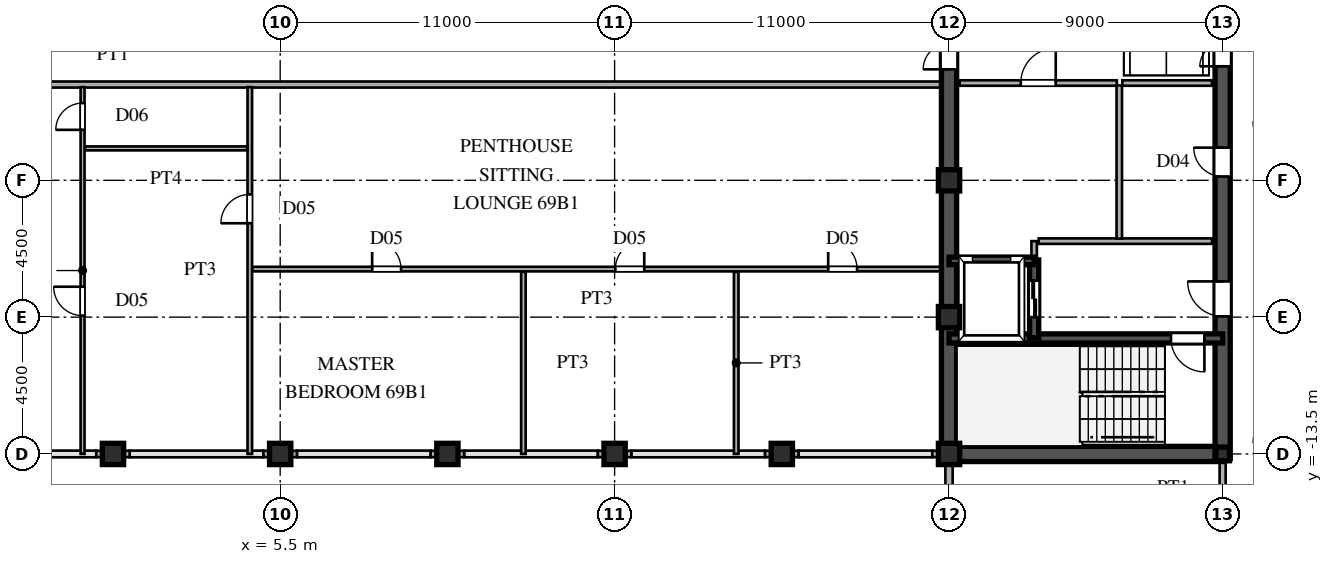
"""IFC4 building model, lengths in metres.
Left out: names, types, materials, properties, quantities, classifications, styles, units other than length and angle.
Written with IfcOpenShell. Run it as: python <this file> out.ifc"""

import sys

from ifc_helpers import new_model, si_unit, direction, frame, frame_2d, origin, origin_2d, place, context, subcontext, project, spatial, rectangle, hollow_rectangle, i_section, extrude, source, transform, mapped, element, fill, save


model = new_model("IFC4")
c1 = context("Model", 3, precision=1e-05, world=origin(), true_north=direction((0.0, 1.0)))
c2 = subcontext(c1, "Body", "Model", "MODEL_VIEW")
j1 = project(units=[si_unit("LENGTHUNIT", "METRE"), si_unit("PLANEANGLEUNIT", "RADIAN")], contexts=[c1])
p1 = place(None, origin())
s1 = spatial("IfcSite", under=j1, at=p1, CompositionType="ELEMENT")
p2 = place(p1, origin())
s2 = spatial("IfcBuilding", under=s1, at=p2, CompositionType="ELEMENT")
p3 = place(p2, frame((0.0, 0.0, 261.9)))
s3 = spatial("IfcBuildingStorey", under=s2, at=p3, CompositionType="ELEMENT", Elevation=261.9)
m1 = source(origin(), c2, "Body", "SweptSolid", [
    extrude(hollow_rectangle(XDim=0.7, YDim=0.7, WallThickness=0.03, at=origin_2d()), origin(), (0.0, 0.0, 1.0), 3.75),
])
for number, where, z_axis, x_axis in (
    (1, (27.5, -13.5, 0.0), (0.0, 0.0, 1.0), (1.0, 0.0, 0.0)),
    (2, (27.5, -9.0, 0.0), (0.0, 0.0, 1.0), (1.0, 0.0, 0.0)),
    (3, (27.5, -4.5, 0.0), (0.0, 0.0, 1.0), (1.0, 0.0, 0.0)),
):
    element("IfcColumn", number, at=place(p3, frame(where, z_axis=z_axis, x_axis=x_axis)), inside=s3, PredefinedType="COLUMN", context=c2, shape_type="MappedRepresentation", body=[
        mapped(m1, transform((0.0, 0.0, 0.0), scale=1.0)),
    ])
m2 = source(origin(), c2, "Body", "SweptSolid", [
    extrude(i_section(OverallWidth=0.45, OverallDepth=0.45, WebThickness=0.016, FlangeThickness=0.025, at=origin_2d()), origin(), (0.0, 0.0, 1.0), 3.75),
])
p4 = place(p3, frame((36.5, -13.5, 0.0), z_axis=(0.0, 0.0, 1.0), x_axis=(1.0, 0.0, 0.0)))
e4 = element("IfcColumn", 4, at=p4, inside=s3, PredefinedType="COLUMN", context=c2, shape_type="MappedRepresentation", body=[
    mapped(m2, transform((0.0, 0.0, 0.0), scale=1.0)),
])
for number, where, z_axis, x_axis in (
    (5, (0.0, -13.5, 0.0), (0.0, 0.0, 1.0), (1.0, 0.0, 0.0)),
    (6, (5.5, -13.5, 0.0), (0.0, 0.0, 1.0), (1.0, 0.0, 0.0)),
    (7, (11.0, -13.5, 0.0), (0.0, 0.0, 1.0), (1.0, 0.0, 0.0)),
    (8, (16.5, -13.5, 0.0), (0.0, 0.0, 1.0), (1.0, 0.0, 0.0)),
    (9, (22.0, -13.5, 0.0), (0.0, 0.0, 1.0), (1.0, 0.0, 0.0)),
):
    element("IfcColumn", number, at=place(p3, frame(where, z_axis=z_axis, x_axis=x_axis)), inside=s3, PredefinedType="COLUMN", context=c2, shape_type="MappedRepresentation", body=[
        mapped(m1, transform((0.0, 0.0, 0.0), scale=1.0)),
    ])
p5 = place(p3, frame((27.5, -15.98, 0.0), z_axis=(0.0, 0.0, 1.0), x_axis=(0.0, 1.0, 0.0)))
e10 = element("IfcWall", 10, at=p5, inside=s3, PredefinedType="SOLIDWALL", context=c2, shape_type="SweptSolid", body=[
    extrude(rectangle(XDim=1.605, YDim=0.24, at=frame_2d((0.803, 0.0))), origin(), (0.0, 0.0, 1.0), 3.53),
])
p6 = place(p3, frame((27.5, -14.375, 0.0), z_axis=(0.0, 0.0, 1.0), x_axis=(0.0, 1.0, 0.0)))
e11 = element("IfcWall", 11, at=p6, inside=s3, PredefinedType="SOLIDWALL", context=c2, shape_type="SweptSolid", body=[
    extrude(rectangle(XDim=0.62, YDim=0.24, at=frame_2d((0.31, 0.0))), origin(), (0.0, 0.0, 1.0), 3.03),
])
for number, where, z_axis, x_axis in (
    (12, (-0.55, -13.5, 0.0), (0.0, 0.0, 1.0), (1.0, 0.0, 0.0)),
    (13, (4.95, -13.5, 0.0), (0.0, 0.0, 1.0), (1.0, 0.0, 0.0)),
    (14, (10.45, -13.5, 0.0), (0.0, 0.0, 1.0), (1.0, 0.0, 0.0)),
    (15, (15.95, -13.5, 0.0), (0.0, 0.0, 1.0), (1.0, 0.0, 0.0)),
    (16, (21.45, -13.5, 0.0), (0.0, 0.0, 1.0), (1.0, 0.0, 0.0)),
):
    element("IfcWall", number, at=place(p3, frame(where, z_axis=z_axis, x_axis=x_axis)), inside=s3, PredefinedType="SOLIDWALL", context=c2, shape_type="SweptSolid", body=[
        extrude(rectangle(XDim=1.1, YDim=0.21, at=frame_2d((0.55, 0.0))), origin(), (0.0, 0.0, 1.0), 3.03),
    ])
p7 = place(p3, frame((26.95, -13.5, 0.0), z_axis=(0.0, 0.0, 1.0), x_axis=(1.0, 0.0, 0.0)))
e17 = element("IfcWall", 17, at=p7, inside=s3, PredefinedType="SOLIDWALL", context=c2, shape_type="SweptSolid", body=[
    extrude(rectangle(XDim=0.54, YDim=0.21, at=frame_2d((0.27, 0.0))), origin(), (0.0, 0.0, 1.0), 3.03),
])
p8 = place(p3, frame((27.5, -13.5, 0.0), z_axis=(0.0, 0.0, 1.0), x_axis=(0.0, 1.0, 0.0)))
e18 = element("IfcWall", 18, at=p8, inside=s3, PredefinedType="SHEAR", context=c2, shape_type="SweptSolid", body=[
    extrude(rectangle(XDim=12.2, YDim=0.5, at=frame_2d((6.1, 0.0))), origin(), (0.0, 0.0, 1.0), 3.53),
])
p9 = place(p3, frame((27.5, -1.3, 0.0), z_axis=(0.0, 0.0, 1.0), x_axis=(0.0, 1.0, 0.0)))
e19 = element("IfcWall", 19, at=p9, inside=s3, PredefinedType="SHEAR", context=c2, shape_type="SweptSolid", body=[
    extrude(rectangle(XDim=2.6, YDim=0.5, at=frame_2d((1.3, 0.0))), origin(), (0.0, 0.0, 1.0), 3.53),
])
p10 = place(p9, frame((0.45, 0.0, 0.0)))
e20 = element("IfcOpeningElement", 20, at=p10, cuts=e19, PredefinedType="OPENING", context=c2, shape_type="SweptSolid", body=[
    extrude(rectangle(XDim=1.7, YDim=2.35, at=frame_2d((0.85, 1.175))), frame((0.0, 0.26, 0.0), z_axis=(0.0, -1.0, 0.0), x_axis=(1.0, 0.0, 0.0)), (0.0, 0.0, 1.0), 0.52),
])
p11 = place(p3, frame((27.5, -13.5, 0.0), z_axis=(0.0, 0.0, 1.0), x_axis=(1.0, 0.0, 0.0)))
e21 = element("IfcWall", 21, at=p11, inside=s3, PredefinedType="SHEAR", context=c2, shape_type="SweptSolid", body=[
    extrude(rectangle(XDim=9.0, YDim=0.5, at=frame_2d((4.5, 0.0))), origin(), (0.0, 0.0, 1.0), 3.53),
])
p12 = place(p3, frame((36.5, -13.65, 0.0), z_axis=(0.0, 0.0, 1.0), x_axis=(0.0, 1.0, 0.0)))
e22 = element("IfcWall", 22, at=p12, inside=s3, PredefinedType="SHEAR", context=c2, shape_type="SweptSolid", body=[
    extrude(rectangle(XDim=7.15, YDim=0.5, at=frame_2d((3.575, 0.0))), origin(), (0.0, 0.0, 1.0), 3.53),
])
p13 = place(p12, frame((4.675, 0.0, 0.0)))
e23 = element("IfcOpeningElement", 23, at=p13, cuts=e22, PredefinedType="OPENING", context=c2, shape_type="SweptSolid", body=[
    extrude(rectangle(XDim=1.15, YDim=2.2, at=frame_2d((0.575, 1.1))), frame((0.0, 0.26, 0.0), z_axis=(0.0, -1.0, 0.0), x_axis=(1.0, 0.0, 0.0)), (0.0, 0.0, 1.0), 0.52),
])
p14 = place(p3, frame((36.5, -1.3, 0.0), z_axis=(0.0, 0.0, 1.0), x_axis=(0.0, 1.0, 0.0)))
e24 = element("IfcWall", 24, at=p14, inside=s3, PredefinedType="SHEAR", context=c2, shape_type="SweptSolid", body=[
    extrude(rectangle(XDim=2.6, YDim=0.5, at=frame_2d((1.3, 0.0))), origin(), (0.0, 0.0, 1.0), 3.53),
])
p15 = place(p14, frame((0.55, 0.0, 0.0)))
e25 = element("IfcOpeningElement", 25, at=p15, cuts=e24, PredefinedType="OPENING", context=c2, shape_type="SweptSolid", body=[
    extrude(rectangle(XDim=1.5, YDim=2.3, at=frame_2d((0.75, 1.15))), frame((0.0, 0.26, 0.0), z_axis=(0.0, -1.0, 0.0), x_axis=(1.0, 0.0, 0.0)), (0.0, 0.0, 1.0), 0.52),
])
p16 = place(p3, frame((36.5, -6.5, 0.0), z_axis=(0.0, 0.0, 1.0), x_axis=(0.0, 1.0, 0.0)))
e26 = element("IfcWall", 26, at=p16, inside=s3, PredefinedType="SHEAR", context=c2, shape_type="SweptSolid", body=[
    extrude(rectangle(XDim=5.2, YDim=0.5, at=frame_2d((2.6, 0.0))), origin(), (0.0, 0.0, 1.0), 3.53),
])
p17 = place(p16, frame((2.125, 0.0, 0.0)))
e27 = element("IfcOpeningElement", 27, at=p17, cuts=e26, PredefinedType="OPENING", context=c2, shape_type="SweptSolid", body=[
    extrude(rectangle(XDim=0.95, YDim=2.15, at=frame_2d((0.475, 1.075))), frame((0.0, 0.26, 0.0), z_axis=(0.0, -1.0, 0.0), x_axis=(1.0, 0.0, 0.0)), (0.0, 0.0, 1.0), 0.52),
])
p18 = place(p3, frame((27.5, -9.7, 0.0), z_axis=(0.0, 0.0, 1.0), x_axis=(1.0, 0.0, 0.0)))
e28 = element("IfcWall", 28, at=p18, inside=s3, PredefinedType="SHEAR", context=c2, shape_type="SweptSolid", body=[
    extrude(rectangle(XDim=9.0, YDim=0.3, at=frame_2d((4.5, 0.0))), origin(), (0.0, 0.0, 1.0), 3.53),
])
p19 = place(p18, frame((7.3, 0.0, 0.0)))
e29 = element("IfcOpeningElement", 29, at=p19, cuts=e28, PredefinedType="OPENING", context=c2, shape_type="SweptSolid", body=[
    extrude(rectangle(XDim=1.1, YDim=2.2, at=frame_2d((0.55, 1.1))), frame((0.0, 0.16, 0.0), z_axis=(0.0, -1.0, 0.0), x_axis=(1.0, 0.0, 0.0)), (0.0, 0.0, 1.0), 0.32),
])
p20 = place(p3, frame((27.5, -7.15, 0.0), z_axis=(0.0, 0.0, 1.0), x_axis=(1.0, 0.0, 0.0)))
e30 = element("IfcWall", 30, at=p20, inside=s3, PredefinedType="SHEAR", context=c2, shape_type="SweptSolid", body=[
    extrude(rectangle(XDim=2.8, YDim=0.25, at=frame_2d((1.4, 0.0))), origin(), (0.0, 0.0, 1.0), 3.53),
])
p21 = place(p3, frame((30.3, -9.68, 0.0), z_axis=(0.0, 0.0, 1.0), x_axis=(0.0, 1.0, 0.0)))
e31 = element("IfcWall", 31, at=p21, inside=s3, PredefinedType="SHEAR", context=c2, shape_type="SweptSolid", body=[
    extrude(rectangle(XDim=2.56, YDim=0.3, at=frame_2d((1.28, 0.0))), origin(), (0.0, 0.0, 1.0), 3.53),
])
p22 = place(p21, frame((0.68, 0.0, 0.0)))
e32 = element("IfcOpeningElement", 32, at=p22, cuts=e31, PredefinedType="OPENING", context=c2, shape_type="SweptSolid", body=[
    extrude(rectangle(XDim=1.2, YDim=2.25, at=frame_2d((0.6, 1.125))), frame((0.0, 0.16, 0.0), z_axis=(0.0, -1.0, 0.0), x_axis=(1.0, 0.0, 0.0)), (0.0, 0.0, 1.0), 0.32),
])
p23 = place(p3, frame((30.45, -6.5, 0.0), z_axis=(0.0, 0.0, 1.0), x_axis=(1.0, 0.0, 0.0)))
e33 = element("IfcWall", 33, at=p23, inside=s3, PredefinedType="PARTITIONING", context=c2, shape_type="SweptSolid", body=[
    extrude(rectangle(XDim=5.7, YDim=0.18, at=frame_2d((2.85, 0.0))), origin(), (0.0, 0.0, 1.0), 3.53),
])
p24 = place(p3, frame((30.3, -7.12, 0.0), z_axis=(0.0, 0.0, 1.0), x_axis=(0.0, 1.0, 0.0)))
e34 = element("IfcWall", 34, at=p24, inside=s3, PredefinedType="PARTITIONING", context=c2, shape_type="SweptSolid", body=[
    extrude(rectangle(XDim=0.62, YDim=0.18, at=frame_2d((0.31, 0.0))), origin(), (0.0, 0.0, 1.0), 3.53),
])
p25 = place(p3, frame((33.1, -6.42, 0.0), z_axis=(0.0, 0.0, 1.0), x_axis=(0.0, 1.0, 0.0)))
e35 = element("IfcWall", 35, at=p25, inside=s3, PredefinedType="PARTITIONING", context=c2, shape_type="SweptSolid", body=[
    extrude(rectangle(XDim=5.04, YDim=0.18, at=frame_2d((2.52, 0.0))), origin(), (0.0, 0.0, 1.0), 3.53),
])
p26 = place(p3, frame((27.85, -1.3, 0.0), z_axis=(0.0, 0.0, 1.0), x_axis=(1.0, 0.0, 0.0)))
e36 = element("IfcWall", 36, at=p26, inside=s3, PredefinedType="PARTITIONING", context=c2, shape_type="SweptSolid", body=[
    extrude(rectangle(XDim=5.17, YDim=0.18, at=frame_2d((2.585, 0.0))), origin(), (0.0, 0.0, 1.0), 3.53),
])
p27 = place(p26, frame((2.01, 0.0, 0.0)))
e37 = element("IfcOpeningElement", 37, at=p27, cuts=e36, PredefinedType="OPENING", context=c2, shape_type="SweptSolid", body=[
    extrude(rectangle(XDim=1.15, YDim=2.2, at=frame_2d((0.575, 1.1))), frame((0.0, 0.1, 0.0), z_axis=(0.0, -1.0, 0.0), x_axis=(1.0, 0.0, 0.0)), (0.0, 0.0, 1.0), 0.2),
])
p28 = place(p3, frame((33.2, -1.3, 0.0), z_axis=(0.0, 0.0, 1.0), x_axis=(1.0, 0.0, 0.0)))
e38 = element("IfcWall", 38, at=p28, inside=s3, PredefinedType="PARTITIONING", context=c2, shape_type="SweptSolid", body=[
    extrude(rectangle(XDim=2.95, YDim=0.18, at=frame_2d((1.475, 0.0))), origin(), (0.0, 0.0, 1.0), 3.53),
])
p29 = place(p3, frame((4.585, -7.42, 0.0), z_axis=(0.0, 0.0, 1.0), x_axis=(1.0, 0.0, 0.0)))
e39 = element("IfcWall", 39, at=p29, inside=s3, PredefinedType="PARTITIONING", context=c2, shape_type="SweptSolid", body=[
    extrude(rectangle(XDim=22.66, YDim=0.15, at=frame_2d((11.33, 0.0))), origin(), (0.0, 0.0, 1.0), 3.53),
])
p30 = place(p29, frame((3.94, 0.0, 0.0)))
e40 = element("IfcOpeningElement", 40, at=p30, cuts=e39, PredefinedType="OPENING", context=c2, shape_type="SweptSolid", body=[
    extrude(rectangle(XDim=0.95, YDim=2.15, at=frame_2d((0.475, 1.075))), frame((0.0, 0.085, 0.0), z_axis=(0.0, -1.0, 0.0), x_axis=(1.0, 0.0, 0.0)), (0.0, 0.0, 1.0), 0.17),
])
p31 = place(p29, frame((11.94, 0.0, 0.0)))
e41 = element("IfcOpeningElement", 41, at=p31, cuts=e39, PredefinedType="OPENING", context=c2, shape_type="SweptSolid", body=[
    extrude(rectangle(XDim=0.95, YDim=2.15, at=frame_2d((0.475, 1.075))), frame((0.0, 0.085, 0.0), z_axis=(0.0, -1.0, 0.0), x_axis=(1.0, 0.0, 0.0)), (0.0, 0.0, 1.0), 0.17),
])
p32 = place(p29, frame((18.94, 0.0, 0.0)))
e42 = element("IfcOpeningElement", 42, at=p32, cuts=e39, PredefinedType="OPENING", context=c2, shape_type="SweptSolid", body=[
    extrude(rectangle(XDim=0.95, YDim=2.15, at=frame_2d((0.475, 1.075))), frame((0.0, 0.085, 0.0), z_axis=(0.0, -1.0, 0.0), x_axis=(1.0, 0.0, 0.0)), (0.0, 0.0, 1.0), 0.17),
])
p33 = place(p3, frame((-0.915, -3.45, 0.0), z_axis=(0.0, 0.0, 1.0), x_axis=(1.0, 0.0, 0.0)))
e43 = element("IfcWall", 43, at=p33, inside=s3, PredefinedType="PARTITIONING", context=c2, shape_type="SweptSolid", body=[
    extrude(rectangle(XDim=5.33, YDim=0.13, at=frame_2d((2.665, 0.0))), origin(), (0.0, 0.0, 1.0), 3.53),
])
p34 = place(p3, frame((-27.245, -1.35, 0.0), z_axis=(0.0, 0.0, 1.0), x_axis=(1.0, 0.0, 0.0)))
e44 = element("IfcWall", 44, at=p34, inside=s3, PredefinedType="PARTITIONING", context=c2, shape_type="SweptSolid", body=[
    extrude(rectangle(XDim=54.49, YDim=0.2, at=frame_2d((27.245, 0.0))), origin(), (0.0, 0.0, 1.0), 3.53),
])
p35 = place(p34, frame((22.47, 0.0, 0.0)))
e45 = element("IfcOpeningElement", 45, at=p35, cuts=e44, PredefinedType="OPENING", context=c2, shape_type="SweptSolid", body=[
    extrude(rectangle(XDim=1.05, YDim=2.25, at=frame_2d((0.525, 1.125))), frame((0.0, 0.11, 0.0), z_axis=(0.0, -1.0, 0.0), x_axis=(1.0, 0.0, 0.0)), (0.0, 0.0, 1.0), 0.22),
])
p36 = place(p3, frame((-1.0, -13.5, 0.0), z_axis=(0.0, 0.0, 1.0), x_axis=(0.0, 1.0, 0.0)))
e46 = element("IfcWall", 46, at=p36, inside=s3, PredefinedType="PARTITIONING", context=c2, shape_type="SweptSolid", body=[
    extrude(rectangle(XDim=12.065, YDim=0.13, at=frame_2d((6.032, 0.0))), origin(), (0.0, 0.0, 1.0), 3.53),
])
p37 = place(p36, frame((10.66, 0.0, 0.0)))
e47 = element("IfcOpeningElement", 47, at=p37, cuts=e46, PredefinedType="OPENING", context=c2, shape_type="SweptSolid", body=[
    extrude(rectangle(XDim=0.88, YDim=2.1, at=frame_2d((0.44, 1.05))), frame((0.0, 0.075, 0.0), z_axis=(0.0, -1.0, 0.0), x_axis=(1.0, 0.0, 0.0)), (0.0, 0.0, 1.0), 0.15),
])
p38 = place(p36, frame((4.55, 0.0, 0.0)))
e48 = element("IfcOpeningElement", 48, at=p38, cuts=e46, PredefinedType="OPENING", context=c2, shape_type="SweptSolid", body=[
    extrude(rectangle(XDim=0.95, YDim=2.15, at=frame_2d((0.475, 1.075))), frame((0.0, 0.075, 0.0), z_axis=(0.0, -1.0, 0.0), x_axis=(1.0, 0.0, 0.0)), (0.0, 0.0, 1.0), 0.15),
])
p39 = place(p3, frame((4.5, -13.5, 0.0), z_axis=(0.0, 0.0, 1.0), x_axis=(0.0, 1.0, 0.0)))
e49 = element("IfcWall", 49, at=p39, inside=s3, PredefinedType="PARTITIONING", context=c2, shape_type="SweptSolid", body=[
    extrude(rectangle(XDim=12.065, YDim=0.15, at=frame_2d((6.032, 0.0))), origin(), (0.0, 0.0, 1.0), 3.53),
])
p40 = place(p39, frame((7.587, 0.0, 0.0)))
e50 = element("IfcOpeningElement", 50, at=p40, cuts=e49, PredefinedType="OPENING", context=c2, shape_type="SweptSolid", body=[
    extrude(rectangle(XDim=0.95, YDim=2.15, at=frame_2d((0.475, 1.075))), frame((0.0, 0.085, 0.0), z_axis=(0.0, -1.0, 0.0), x_axis=(1.0, 0.0, 0.0)), (0.0, 0.0, 1.0), 0.17),
])
for number, where, z_axis, x_axis in (
    (51, (13.5, -13.5, 0.0), (0.0, 0.0, 1.0), (0.0, 1.0, 0.0)),
    (52, (20.5, -13.5, 0.0), (0.0, 0.0, 1.0), (0.0, 1.0, 0.0)),
):
    element("IfcWall", number, at=place(p3, frame(where, z_axis=z_axis, x_axis=x_axis)), inside=s3, PredefinedType="PARTITIONING", context=c2, shape_type="SweptSolid", body=[
        extrude(rectangle(XDim=5.99, YDim=0.15, at=frame_2d((2.995, 0.0))), origin(), (0.0, 0.0, 1.0), 3.53),
    ])
p41 = place(p3, frame((36.5, -15.515, 0.0), z_axis=(0.0, 0.0, 1.0), x_axis=(0.0, 1.0, 0.0)))
e53 = element("IfcWall", 53, at=p41, inside=s3, PredefinedType="PARTITIONING", context=c2, shape_type="SweptSolid", body=[
    extrude(rectangle(XDim=1.76, YDim=0.2, at=frame_2d((0.88, 0.0))), origin(), (0.0, 0.0, 1.0), 2.93),
])
m3 = source(origin(), c2, "Body", "SweptSolid", [
    extrude(rectangle(XDim=1.7, YDim=2.35, at=frame_2d((0.85, 1.175))), frame((0.0, 0.025, 0.0), z_axis=(0.0, -1.0, 0.0), x_axis=(1.0, 0.0, 0.0)), (0.0, 0.0, 1.0), 0.05),
])
p42 = place(p10, origin())
e54 = element("IfcDoor", 54, at=p42, inside=s3, OperationType="DOUBLE_SWING_LEFT", PredefinedType="DOOR", context=c2, shape_type="MappedRepresentation", body=[
    mapped(m3, transform((0.0, 0.0, 0.0), scale=1.0)),
])
fill(e20, e54)
m4 = source(origin(), c2, "Body", "SweptSolid", [
    extrude(rectangle(XDim=1.15, YDim=2.2, at=frame_2d((0.575, 1.1))), frame((0.0, 0.025, 0.0), z_axis=(0.0, -1.0, 0.0), x_axis=(1.0, 0.0, 0.0)), (0.0, 0.0, 1.0), 0.05),
])
p43 = place(p13, origin())
e55 = element("IfcDoor", 55, at=p43, inside=s3, OperationType="SINGLE_SWING_RIGHT", PredefinedType="DOOR", context=c2, shape_type="MappedRepresentation", body=[
    mapped(m4, transform((0.0, 0.0, 0.0), scale=1.0)),
])
fill(e23, e55)
m5 = source(origin(), c2, "Body", "SweptSolid", [
    extrude(rectangle(XDim=1.5, YDim=2.3, at=frame_2d((0.75, 1.15))), frame((0.0, 0.025, 0.0), z_axis=(0.0, -1.0, 0.0), x_axis=(1.0, 0.0, 0.0)), (0.0, 0.0, 1.0), 0.05),
])
p44 = place(p15, origin())
e56 = element("IfcDoor", 56, at=p44, inside=s3, OperationType="DOUBLE_SWING_LEFT", PredefinedType="DOOR", context=c2, shape_type="MappedRepresentation", body=[
    mapped(m5, transform((0.0, 0.0, 0.0), scale=1.0)),
])
fill(e25, e56)
m6 = source(origin(), c2, "Body", "SweptSolid", [
    extrude(rectangle(XDim=0.95, YDim=2.15, at=frame_2d((0.475, 1.075))), frame((0.0, 0.025, 0.0), z_axis=(0.0, -1.0, 0.0), x_axis=(1.0, 0.0, 0.0)), (0.0, 0.0, 1.0), 0.05),
])
p45 = place(p17, origin())
e57 = element("IfcDoor", 57, at=p45, inside=s3, OperationType="SINGLE_SWING_RIGHT", PredefinedType="DOOR", context=c2, shape_type="MappedRepresentation", body=[
    mapped(m6, transform((0.0, 0.0, 0.0), scale=1.0)),
])
fill(e27, e57)
m7 = source(origin(), c2, "Body", "SweptSolid", [
    extrude(rectangle(XDim=1.1, YDim=2.2, at=frame_2d((0.55, 1.1))), frame((0.0, 0.025, 0.0), z_axis=(0.0, -1.0, 0.0), x_axis=(1.0, 0.0, 0.0)), (0.0, 0.0, 1.0), 0.05),
])
p46 = place(p19, frame((1.1, 0.0, 0.0), z_axis=(0.0, 0.0, 1.0), x_axis=(-1.0, 0.0, 0.0)))
e58 = element("IfcDoor", 58, at=p46, inside=s3, OperationType="SINGLE_SWING_RIGHT", PredefinedType="DOOR", context=c2, shape_type="MappedRepresentation", body=[
    mapped(m7, transform((0.0, 0.0, 0.0), scale=1.0)),
])
fill(e29, e58)
m8 = source(origin(), c2, "Body", "SweptSolid", [
    extrude(rectangle(XDim=1.2, YDim=2.25, at=frame_2d((0.6, 1.125))), frame((0.0, 0.025, 0.0), z_axis=(0.0, -1.0, 0.0), x_axis=(1.0, 0.0, 0.0)), (0.0, 0.0, 1.0), 0.05),
])
p47 = place(p22, origin())
e59 = element("IfcDoor", 59, at=p47, inside=s3, OperationType="DOUBLE_DOOR_SLIDING", PredefinedType="DOOR", context=c2, shape_type="MappedRepresentation", body=[
    mapped(m8, transform((0.0, 0.0, 0.0), scale=1.0)),
])
fill(e32, e59)
p48 = place(p27, origin())
e60 = element("IfcDoor", 60, at=p48, inside=s3, OperationType="SINGLE_SWING_RIGHT", PredefinedType="DOOR", context=c2, shape_type="MappedRepresentation", body=[
    mapped(m4, transform((0.0, 0.0, 0.0), scale=1.0)),
])
fill(e37, e60)
m9 = source(origin(), c2, "Body", "SweptSolid", [
    extrude(rectangle(XDim=0.95, YDim=2.15, at=frame_2d((0.475, 1.075))), frame((0.0, 0.025, 0.0), z_axis=(0.0, -1.0, 0.0), x_axis=(1.0, 0.0, 0.0)), (0.0, 0.0, 1.0), 0.05),
])
p49 = place(p30, origin())
e61 = element("IfcDoor", 61, at=p49, inside=s3, OperationType="SINGLE_SWING_LEFT", PredefinedType="DOOR", context=c2, shape_type="MappedRepresentation", body=[
    mapped(m9, transform((0.0, 0.0, 0.0), scale=1.0)),
])
fill(e40, e61)
p50 = place(p31, origin())
e62 = element("IfcDoor", 62, at=p50, inside=s3, OperationType="SINGLE_SWING_RIGHT", PredefinedType="DOOR", context=c2, shape_type="MappedRepresentation", body=[
    mapped(m9, transform((0.0, 0.0, 0.0), scale=1.0)),
])
fill(e41, e62)
p51 = place(p32, origin())
e63 = element("IfcDoor", 63, at=p51, inside=s3, OperationType="SINGLE_SWING_LEFT", PredefinedType="DOOR", context=c2, shape_type="MappedRepresentation", body=[
    mapped(m9, transform((0.0, 0.0, 0.0), scale=1.0)),
])
fill(e42, e63)
m10 = source(origin(), c2, "Body", "SweptSolid", [
    extrude(rectangle(XDim=0.88, YDim=2.1, at=frame_2d((0.44, 1.05))), frame((0.0, 0.025, 0.0), z_axis=(0.0, -1.0, 0.0), x_axis=(1.0, 0.0, 0.0)), (0.0, 0.0, 1.0), 0.05),
])
p52 = place(p37, origin())
e64 = element("IfcDoor", 64, at=p52, inside=s3, OperationType="SINGLE_SWING_LEFT", PredefinedType="DOOR", context=c2, shape_type="MappedRepresentation", body=[
    mapped(m10, transform((0.0, 0.0, 0.0), scale=1.0)),
])
fill(e47, e64)
p53 = place(p38, origin())
e65 = element("IfcDoor", 65, at=p53, inside=s3, OperationType="SINGLE_SWING_RIGHT", PredefinedType="DOOR", context=c2, shape_type="MappedRepresentation", body=[
    mapped(m9, transform((0.0, 0.0, 0.0), scale=1.0)),
])
fill(e48, e65)
p54 = place(p40, origin())
e66 = element("IfcDoor", 66, at=p54, inside=s3, OperationType="SINGLE_SWING_LEFT", PredefinedType="DOOR", context=c2, shape_type="MappedRepresentation", body=[
    mapped(m9, transform((0.0, 0.0, 0.0), scale=1.0)),
])
fill(e50, e66)
save(model, sys.argv[1])
